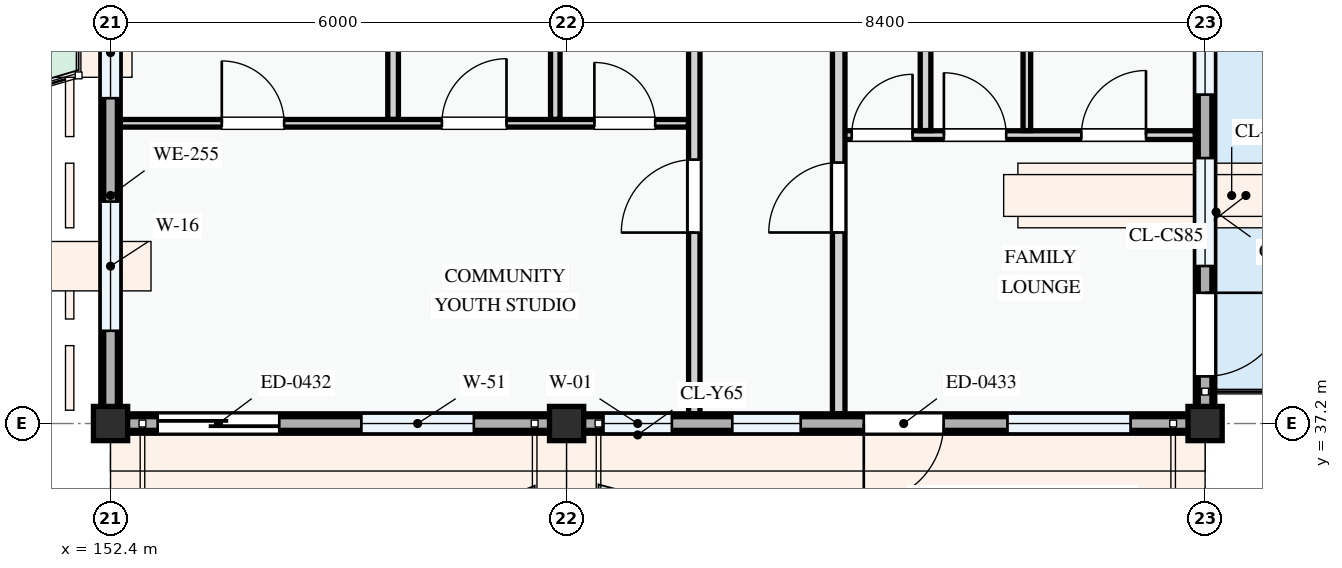
"""IFC4 building model, lengths in metres.
Left out: names, types, materials, properties, quantities, classifications, styles, units other than length and angle.
Written with IfcOpenShell. Run it as: python <this file> out.ifc"""

import sys

from ifc_helpers import new_model, si_unit, direction, frame, frame_2d, origin, origin_2d, place, context, subcontext, project, spatial, polyline, rectangle, outline, extrude, element, fill, save


model = new_model("IFC4")
c1 = context("Model", 3, precision=1e-05, world=origin(), true_north=direction((0.0, 1.0)))
c2 = subcontext(c1, "Body", "Model", "MODEL_VIEW")
j1 = project(units=[si_unit("LENGTHUNIT", "METRE"), si_unit("PLANEANGLEUNIT", "RADIAN")], contexts=[c1])
p1 = place(None, origin())
s1 = spatial("IfcSite", under=j1, at=p1, CompositionType="ELEMENT")
p2 = place(p1, origin())
s2 = spatial("IfcBuilding", under=s1, at=p2, CompositionType="ELEMENT")
p3 = place(p2, frame((0.0, 0.0, 27.9)))
s3 = spatial("IfcBuildingStorey", under=s2, at=p3, CompositionType="ELEMENT", Elevation=27.9)
for number, where, z_axis, x_axis in (
    (1, (152.4, 37.2, 0.0), (0.0, 0.0, 1.0), (1.0, 0.0, 0.0)),
    (2, (158.4, 37.2, 0.0), (0.0, 0.0, 1.0), (1.0, 0.0, 0.0)),
    (3, (166.8, 37.2, 0.0), (0.0, 0.0, 1.0), (1.0, 0.0, 0.0)),
):
    element("IfcColumn", number, at=place(p3, frame(where, z_axis=z_axis, x_axis=x_axis)), inside=s3, PredefinedType="COLUMN", context=c2, shape_type="SweptSolid", body=[
        extrude(rectangle(XDim=0.45, YDim=0.45, at=origin_2d()), origin(), (0.0, 0.0, 1.0), 3.3),
    ])
p4 = place(p3, frame((152.4, 43.2, 0.0), z_axis=(0.0, 0.0, 1.0), x_axis=(0.0, -1.0, 0.0)))
e4 = element("IfcWall", 4, at=p4, inside=s3, PredefinedType="STANDARD", context=c2, shape_type="SweptSolid", body=[
    extrude(rectangle(XDim=6.0, YDim=0.255, at=frame_2d((3.0, 0.0))), origin(), (0.0, 0.0, 1.0), 2.575),
])
p5 = place(p4, frame((0.52, 0.0, 0.78)))
e5 = element("IfcOpeningElement", 5, at=p5, cuts=e4, PredefinedType="OPENING", context=c2, shape_type="SweptSolid", body=[
    extrude(rectangle(XDim=1.2, YDim=1.5, at=frame_2d((0.6, 0.75))), frame((0.0, 0.137, 0.0), z_axis=(0.0, -1.0, 0.0), x_axis=(1.0, 0.0, 0.0)), (0.0, 0.0, 1.0), 0.275),
])
p6 = place(p4, frame((3.08, 0.0, 0.78)))
e6 = element("IfcOpeningElement", 6, at=p6, cuts=e4, PredefinedType="OPENING", context=c2, shape_type="SweptSolid", body=[
    extrude(rectangle(XDim=1.7, YDim=1.6, at=frame_2d((0.85, 0.8))), frame((0.0, 0.137, 0.0), z_axis=(0.0, -1.0, 0.0), x_axis=(1.0, 0.0, 0.0)), (0.0, 0.0, 1.0), 0.275),
])
p7 = place(p3, frame((152.4, 37.2, 0.0), z_axis=(0.0, 0.0, 1.0), x_axis=(1.0, 0.0, 0.0)))
e7 = element("IfcWall", 7, at=p7, inside=s3, PredefinedType="STANDARD", context=c2, shape_type="SweptSolid", body=[
    extrude(rectangle(XDim=6.0, YDim=0.255, at=frame_2d((3.0, 0.0))), origin(), (0.0, 0.0, 1.0), 2.475),
])
p8 = place(p7, frame((0.62, 0.0, 0.0)))
e8 = element("IfcOpeningElement", 8, at=p8, cuts=e7, PredefinedType="OPENING", context=c2, shape_type="SweptSolid", body=[
    extrude(rectangle(XDim=1.6, YDim=2.2, at=frame_2d((0.8, 1.1))), frame((0.0, 0.137, 0.0), z_axis=(0.0, -1.0, 0.0), x_axis=(1.0, 0.0, 0.0)), (0.0, 0.0, 1.0), 0.275),
])
p9 = place(p7, frame((3.3, 0.0, 0.78)))
e9 = element("IfcOpeningElement", 9, at=p9, cuts=e7, PredefinedType="OPENING", context=c2, shape_type="SweptSolid", body=[
    extrude(rectangle(XDim=1.48, YDim=1.52, at=frame_2d((0.74, 0.76))), frame((0.0, 0.137, 0.0), z_axis=(0.0, -1.0, 0.0), x_axis=(1.0, 0.0, 0.0)), (0.0, 0.0, 1.0), 0.275),
])
p10 = place(p3, frame((158.4, 37.2, 0.0), z_axis=(0.0, 0.0, 1.0), x_axis=(1.0, 0.0, 0.0)))
e10 = element("IfcWall", 10, at=p10, inside=s3, PredefinedType="STANDARD", context=c2, shape_type="SweptSolid", body=[
    extrude(rectangle(XDim=8.4, YDim=0.255, at=frame_2d((4.2, 0.0))), origin(), (0.0, 0.0, 1.0), 2.375),
])
p11 = place(p10, frame((3.91, 0.0, 0.0)))
e11 = element("IfcOpeningElement", 11, at=p11, cuts=e10, PredefinedType="OPENING", context=c2, shape_type="SweptSolid", body=[
    extrude(rectangle(XDim=1.05, YDim=2.15, at=frame_2d((0.525, 1.075))), frame((0.0, 0.137, 0.0), z_axis=(0.0, -1.0, 0.0), x_axis=(1.0, 0.0, 0.0)), (0.0, 0.0, 1.0), 0.275),
])
p12 = place(p10, frame((0.485, 0.0, 0.78)))
e12 = element("IfcOpeningElement", 12, at=p12, cuts=e10, PredefinedType="OPENING", context=c2, shape_type="SweptSolid", body=[
    extrude(rectangle(XDim=0.9, YDim=1.2, at=frame_2d((0.45, 0.6))), frame((0.0, 0.137, 0.0), z_axis=(0.0, -1.0, 0.0), x_axis=(1.0, 0.0, 0.0)), (0.0, 0.0, 1.0), 0.275),
])
p13 = place(p10, frame((2.18, 0.0, 0.78)))
e13 = element("IfcOpeningElement", 13, at=p13, cuts=e10, PredefinedType="OPENING", context=c2, shape_type="SweptSolid", body=[
    extrude(rectangle(XDim=0.9, YDim=1.2, at=frame_2d((0.45, 0.6))), frame((0.0, 0.137, 0.0), z_axis=(0.0, -1.0, 0.0), x_axis=(1.0, 0.0, 0.0)), (0.0, 0.0, 1.0), 0.275),
])
p14 = place(p10, frame((5.8, 0.0, 0.78)))
e14 = element("IfcOpeningElement", 14, at=p14, cuts=e10, PredefinedType="OPENING", context=c2, shape_type="SweptSolid", body=[
    extrude(rectangle(XDim=1.62, YDim=1.38, at=frame_2d((0.81, 0.69))), frame((0.0, 0.137, 0.0), z_axis=(0.0, -1.0, 0.0), x_axis=(1.0, 0.0, 0.0)), (0.0, 0.0, 1.0), 0.275),
])
p15 = place(p3, frame((166.8, 37.2, 0.0), z_axis=(0.0, 0.0, 1.0), x_axis=(0.0, 1.0, 0.0)))
e15 = element("IfcWall", 15, at=p15, inside=s3, PredefinedType="STANDARD", context=c2, shape_type="SweptSolid", body=[
    extrude(rectangle(XDim=6.0, YDim=0.255, at=frame_2d((3.0, 0.0))), origin(), (0.0, 0.0, 1.0), 2.445),
])
p16 = place(p15, frame((0.62, 0.0, 0.0)))
e16 = element("IfcOpeningElement", 16, at=p16, cuts=e15, PredefinedType="OPENING", context=c2, shape_type="SweptSolid", body=[
    extrude(rectangle(XDim=1.1, YDim=2.15, at=frame_2d((0.55, 1.075))), frame((0.0, 0.137, 0.0), z_axis=(0.0, -1.0, 0.0), x_axis=(1.0, 0.0, 0.0)), (0.0, 0.0, 1.0), 0.275),
])
p17 = place(p15, frame((2.072, 0.0, 0.78)))
e17 = element("IfcOpeningElement", 17, at=p17, cuts=e15, PredefinedType="OPENING", context=c2, shape_type="SweptSolid", body=[
    extrude(rectangle(XDim=1.42, YDim=1.38, at=frame_2d((0.71, 0.69))), frame((0.0, 0.137, 0.0), z_axis=(0.0, -1.0, 0.0), x_axis=(1.0, 0.0, 0.0)), (0.0, 0.0, 1.0), 0.275),
])
p18 = place(p15, frame((4.327, 0.0, 0.78)))
e18 = element("IfcOpeningElement", 18, at=p18, cuts=e15, PredefinedType="OPENING", context=c2, shape_type="SweptSolid", body=[
    extrude(rectangle(XDim=0.95, YDim=1.15, at=frame_2d((0.475, 0.575))), frame((0.0, 0.137, 0.0), z_axis=(0.0, -1.0, 0.0), x_axis=(1.0, 0.0, 0.0)), (0.0, 0.0, 1.0), 0.275),
])
p19 = place(p3, frame((152.4, 43.2, 3.3), z_axis=(0.0, 0.0, 1.0), x_axis=(0.0, -1.0, 0.0)))
e19 = element("IfcWall", 19, at=p19, inside=s3, PredefinedType="PARAPET", context=c2, shape_type="SweptSolid", body=[
    extrude(rectangle(XDim=6.0, YDim=0.18, at=frame_2d((3.0, 0.0))), origin(), (0.0, 0.0, 1.0), 1.15),
])
p20 = place(p3, frame((152.4, 37.2, 3.3), z_axis=(0.0, 0.0, 1.0), x_axis=(1.0, 0.0, 0.0)))
e20 = element("IfcWall", 20, at=p20, inside=s3, PredefinedType="PARAPET", context=c2, shape_type="SweptSolid", body=[
    extrude(outline(polyline([(0.0, 0.0), (6.0, 0.0), (6.0, 1.12), (5.5, 1.322), (5.0, 1.484), (4.5, 1.618), (4.0, 1.718), (3.5, 1.779), (3.0, 1.8), (2.5, 1.779), (2.0, 1.718), (1.5, 1.618), (1.0, 1.484), (0.5, 1.322), (0.0, 1.12), (0.0, 0.0)])), frame((0.0, 0.09, 0.0), z_axis=(0.0, -1.0, 0.0), x_axis=(1.0, 0.0, 0.0)), (0.0, 0.0, 1.0), 0.18),
])
p21 = place(p3, frame((158.4, 37.2, 3.3), z_axis=(0.0, 0.0, 1.0), x_axis=(1.0, 0.0, 0.0)))
e21 = element("IfcWall", 21, at=p21, inside=s3, PredefinedType="PARAPET", context=c2, shape_type="SweptSolid", body=[
    extrude(outline(polyline([(0.0, 0.0), (8.4, 0.0), (8.4, 1.12), (7.7, 1.322), (7.0, 1.484), (6.3, 1.618), (5.6, 1.718), (4.9, 1.779), (4.2, 1.8), (3.5, 1.779), (2.8, 1.718), (2.1, 1.618), (1.4, 1.484), (0.7, 1.322), (0.0, 1.12), (0.0, 0.0)])), frame((0.0, 0.09, 0.0), z_axis=(0.0, -1.0, 0.0), x_axis=(1.0, 0.0, 0.0)), (0.0, 0.0, 1.0), 0.18),
])
p22 = place(p3, frame((166.8, 37.2, 3.3), z_axis=(0.0, 0.0, 1.0), x_axis=(0.0, 1.0, 0.0)))
e22 = element("IfcWall", 22, at=p22, inside=s3, PredefinedType="PARAPET", context=c2, shape_type="SweptSolid", body=[
    extrude(outline(polyline([(0.0, 0.0), (6.0, 0.0), (6.0, 1.12), (5.5, 1.322), (5.0, 1.484), (4.5, 1.618), (4.0, 1.718), (3.5, 1.779), (3.0, 1.8), (2.5, 1.779), (2.0, 1.718), (1.5, 1.618), (1.0, 1.484), (0.5, 1.322), (0.0, 1.12), (0.0, 0.0)])), frame((0.0, 0.09, 0.0), z_axis=(0.0, -1.0, 0.0), x_axis=(1.0, 0.0, 0.0)), (0.0, 0.0, 1.0), 0.18),
])
p23 = place(p3, frame((152.53, 41.15, 0.0), z_axis=(0.0, 0.0, 1.0), x_axis=(1.0, 0.0, 0.0)))
e23 = element("IfcWall", 23, at=p23, inside=s3, PredefinedType="PARTITIONING", context=c2, shape_type="SweptSolid", body=[
    extrude(rectangle(XDim=7.473, YDim=0.1, at=frame_2d((3.737, 0.0))), origin(), (0.0, 0.0, 1.0), 3.0),
])
p24 = place(p23, frame((1.334, 0.0, 0.0)))
e24 = element("IfcOpeningElement", 24, at=p24, cuts=e23, PredefinedType="OPENING", context=c2, shape_type="SweptSolid", body=[
    extrude(rectangle(XDim=0.82, YDim=2.08, at=frame_2d((0.41, 1.04))), frame((0.0, 0.06, 0.0), z_axis=(0.0, -1.0, 0.0), x_axis=(1.0, 0.0, 0.0)), (0.0, 0.0, 1.0), 0.12),
])
p25 = place(p23, frame((4.23, 0.0, 0.0)))
e25 = element("IfcOpeningElement", 25, at=p25, cuts=e23, PredefinedType="OPENING", context=c2, shape_type="SweptSolid", body=[
    extrude(rectangle(XDim=0.85, YDim=2.1, at=frame_2d((0.425, 1.05))), frame((0.0, 0.06, 0.0), z_axis=(0.0, -1.0, 0.0), x_axis=(1.0, 0.0, 0.0)), (0.0, 0.0, 1.0), 0.12),
])
p26 = place(p23, frame((6.236, 0.0, 0.0)))
e26 = element("IfcOpeningElement", 26, at=p26, cuts=e23, PredefinedType="OPENING", context=c2, shape_type="SweptSolid", body=[
    extrude(rectangle(XDim=0.8, YDim=2.1, at=frame_2d((0.4, 1.05))), frame((0.0, 0.06, 0.0), z_axis=(0.0, -1.0, 0.0), x_axis=(1.0, 0.0, 0.0)), (0.0, 0.0, 1.0), 0.12),
])
p27 = place(p3, frame((156.118, 41.202, 0.0), z_axis=(0.0, 0.0, 1.0), x_axis=(0.0, 1.0, 0.0)))
e27 = element("IfcWall", 27, at=p27, inside=s3, PredefinedType="PARTITIONING", context=c2, shape_type="SweptSolid", body=[
    extrude(rectangle(XDim=3.744, YDim=0.14, at=frame_2d((1.872, 0.0))), origin(), (0.0, 0.0, 1.0), 3.0),
])
p28 = place(p3, frame((158.251, 41.202, 0.0), z_axis=(0.0, 0.0, 1.0), x_axis=(0.0, 1.0, 0.0)))
e28 = element("IfcWall", 28, at=p28, inside=s3, PredefinedType="PARTITIONING", context=c2, shape_type="SweptSolid", body=[
    extrude(rectangle(XDim=3.744, YDim=0.125, at=frame_2d((1.872, 0.0))), origin(), (0.0, 0.0, 1.0), 2.425),
])
p29 = place(p3, frame((161.98, 40.994, 0.0), z_axis=(0.0, 0.0, 1.0), x_axis=(1.0, 0.0, 0.0)))
e29 = element("IfcWall", 29, at=p29, inside=s3, PredefinedType="PARTITIONING", context=c2, shape_type="SweptSolid", body=[
    extrude(rectangle(XDim=4.69, YDim=0.115, at=frame_2d((2.345, 0.0))), origin(), (0.0, 0.0, 1.0), 3.0),
])
p30 = place(p29, frame((0.171, 0.0, 0.0)))
e30 = element("IfcOpeningElement", 30, at=p30, cuts=e29, PredefinedType="OPENING", context=c2, shape_type="SweptSolid", body=[
    extrude(rectangle(XDim=0.8, YDim=2.1, at=frame_2d((0.4, 1.05))), frame((0.0, 0.067, 0.0), z_axis=(0.0, -1.0, 0.0), x_axis=(1.0, 0.0, 0.0)), (0.0, 0.0, 1.0), 0.135),
])
p31 = place(p29, frame((1.384, 0.0, 0.0)))
e31 = element("IfcOpeningElement", 31, at=p31, cuts=e29, PredefinedType="OPENING", context=c2, shape_type="SweptSolid", body=[
    extrude(rectangle(XDim=0.82, YDim=2.08, at=frame_2d((0.41, 1.04))), frame((0.0, 0.067, 0.0), z_axis=(0.0, -1.0, 0.0), x_axis=(1.0, 0.0, 0.0)), (0.0, 0.0, 1.0), 0.135),
])
p32 = place(p29, frame((3.193, 0.0, 0.0)))
e32 = element("IfcOpeningElement", 32, at=p32, cuts=e29, PredefinedType="OPENING", context=c2, shape_type="SweptSolid", body=[
    extrude(rectangle(XDim=0.85, YDim=2.1, at=frame_2d((0.425, 1.05))), frame((0.0, 0.067, 0.0), z_axis=(0.0, -1.0, 0.0), x_axis=(1.0, 0.0, 0.0)), (0.0, 0.0, 1.0), 0.135),
])
p33 = place(p3, frame((164.455, 41.054, 0.0), z_axis=(0.0, 0.0, 1.0), x_axis=(0.0, 1.0, 0.0)))
e33 = element("IfcWall", 33, at=p33, inside=s3, PredefinedType="PARTITIONING", context=c2, shape_type="SweptSolid", body=[
    extrude(rectangle(XDim=3.884, YDim=0.1, at=frame_2d((1.942, 0.0))), origin(), (0.0, 0.0, 1.0), 3.0),
])
p34 = place(p3, frame((163.122, 41.054, 0.0), z_axis=(0.0, 0.0, 1.0), x_axis=(0.0, 1.0, 0.0)))
e34 = element("IfcWall", 34, at=p34, inside=s3, PredefinedType="PARTITIONING", context=c2, shape_type="SweptSolid", body=[
    extrude(rectangle(XDim=3.884, YDim=0.14, at=frame_2d((1.942, 0.0))), origin(), (0.0, 0.0, 1.0), 3.0),
])
p35 = place(p3, frame((160.08, 37.33, 0.0), z_axis=(0.0, 0.0, 1.0), x_axis=(0.0, 1.0, 0.0)))
e35 = element("IfcWall", 35, at=p35, inside=s3, PredefinedType="PARTITIONING", context=c2, shape_type="SweptSolid", body=[
    extrude(rectangle(XDim=20.41, YDim=0.15, at=frame_2d((10.205, 0.0))), origin(), (0.0, 0.0, 1.0), 3.0),
])
p36 = place(p35, frame((2.383, 0.0, 0.0)))
e36 = element("IfcOpeningElement", 36, at=p36, cuts=e35, PredefinedType="OPENING", context=c2, shape_type="SweptSolid", body=[
    extrude(rectangle(XDim=0.96, YDim=2.12, at=frame_2d((0.48, 1.06))), frame((0.0, 0.085, 0.0), z_axis=(0.0, -1.0, 0.0), x_axis=(1.0, 0.0, 0.0)), (0.0, 0.0, 1.0), 0.17),
])
p37 = place(p35, frame((9.605, 0.0, 0.0)))
e37 = element("IfcOpeningElement", 37, at=p37, cuts=e35, PredefinedType="OPENING", context=c2, shape_type="SweptSolid", body=[
    extrude(rectangle(XDim=0.92, YDim=2.1, at=frame_2d((0.46, 1.05))), frame((0.0, 0.085, 0.0), z_axis=(0.0, -1.0, 0.0), x_axis=(1.0, 0.0, 0.0)), (0.0, 0.0, 1.0), 0.17),
])
p38 = place(p3, frame((161.98, 37.33, 0.0), z_axis=(0.0, 0.0, 1.0), x_axis=(0.0, 1.0, 0.0)))
e38 = element("IfcWall", 38, at=p38, inside=s3, PredefinedType="PARTITIONING", context=c2, shape_type="SweptSolid", body=[
    extrude(rectangle(XDim=20.41, YDim=0.165, at=frame_2d((10.205, 0.0))), origin(), (0.0, 0.0, 1.0), 3.0),
])
p39 = place(p38, frame((2.384, 0.0, 0.0)))
e39 = element("IfcOpeningElement", 39, at=p39, cuts=e38, PredefinedType="OPENING", context=c2, shape_type="SweptSolid", body=[
    extrude(rectangle(XDim=0.92, YDim=2.1, at=frame_2d((0.46, 1.05))), frame((0.0, 0.093, 0.0), z_axis=(0.0, -1.0, 0.0), x_axis=(1.0, 0.0, 0.0)), (0.0, 0.0, 1.0), 0.185),
])
p40 = place(p38, frame((9.628, 0.0, 0.0)))
e40 = element("IfcOpeningElement", 40, at=p40, cuts=e38, PredefinedType="OPENING", context=c2, shape_type="SweptSolid", body=[
    extrude(rectangle(XDim=0.92, YDim=2.1, at=frame_2d((0.46, 1.05))), frame((0.0, 0.093, 0.0), z_axis=(0.0, -1.0, 0.0), x_axis=(1.0, 0.0, 0.0)), (0.0, 0.0, 1.0), 0.185),
])
p41 = place(p5, origin())
e41 = element("IfcWindow", 41, at=p41, inside=s3, PartitioningType="SINGLE_PANEL", PredefinedType="WINDOW", context=c2, shape_type="SweptSolid", body=[
    extrude(rectangle(XDim=1.2, YDim=1.5, at=frame_2d((0.6, 0.75))), frame((0.0, 0.03, 0.0), z_axis=(0.0, -1.0, 0.0), x_axis=(1.0, 0.0, 0.0)), (0.0, 0.0, 1.0), 0.06),
])
fill(e5, e41)
p42 = place(p6, origin())
e42 = element("IfcWindow", 42, at=p42, inside=s3, PartitioningType="DOUBLE_PANEL_VERTICAL", PredefinedType="WINDOW", context=c2, shape_type="SweptSolid", body=[
    extrude(rectangle(XDim=1.7, YDim=1.6, at=frame_2d((0.85, 0.8))), frame((0.0, 0.03, 0.0), z_axis=(0.0, -1.0, 0.0), x_axis=(1.0, 0.0, 0.0)), (0.0, 0.0, 1.0), 0.06),
])
fill(e6, e42)
p43 = place(p8, frame((1.6, 0.0, 0.0), z_axis=(0.0, 0.0, 1.0), x_axis=(-1.0, 0.0, 0.0)))
e43 = element("IfcDoor", 43, at=p43, inside=s3, OperationType="SLIDING_TO_LEFT", PredefinedType="DOOR", context=c2, shape_type="SweptSolid", body=[
    extrude(rectangle(XDim=1.6, YDim=2.2, at=frame_2d((0.8, 1.1))), frame((0.0, 0.025, 0.0), z_axis=(0.0, -1.0, 0.0), x_axis=(1.0, 0.0, 0.0)), (0.0, 0.0, 1.0), 0.05),
])
fill(e8, e43)
p44 = place(p9, origin())
e44 = element("IfcWindow", 44, at=p44, inside=s3, PartitioningType="SINGLE_PANEL", PredefinedType="WINDOW", context=c2, shape_type="SweptSolid", body=[
    extrude(rectangle(XDim=1.48, YDim=1.52, at=frame_2d((0.74, 0.76))), frame((0.0, 0.03, 0.0), z_axis=(0.0, -1.0, 0.0), x_axis=(1.0, 0.0, 0.0)), (0.0, 0.0, 1.0), 0.06),
])
fill(e9, e44)
p45 = place(p11, frame((1.05, 0.0, 0.0), z_axis=(0.0, 0.0, 1.0), x_axis=(-1.0, 0.0, 0.0)))
e45 = element("IfcDoor", 45, at=p45, inside=s3, OperationType="SINGLE_SWING_RIGHT", PredefinedType="DOOR", context=c2, shape_type="SweptSolid", body=[
    extrude(rectangle(XDim=1.05, YDim=2.15, at=frame_2d((0.525, 1.075))), frame((0.0, 0.025, 0.0), z_axis=(0.0, -1.0, 0.0), x_axis=(1.0, 0.0, 0.0)), (0.0, 0.0, 1.0), 0.05),
])
fill(e11, e45)
p46 = place(p12, origin())
e46 = element("IfcWindow", 46, at=p46, inside=s3, PartitioningType="SINGLE_PANEL", PredefinedType="WINDOW", context=c2, shape_type="SweptSolid", body=[
    extrude(rectangle(XDim=0.9, YDim=1.2, at=frame_2d((0.45, 0.6))), frame((0.0, 0.03, 0.0), z_axis=(0.0, -1.0, 0.0), x_axis=(1.0, 0.0, 0.0)), (0.0, 0.0, 1.0), 0.06),
])
fill(e12, e46)
p47 = place(p13, origin())
e47 = element("IfcWindow", 47, at=p47, inside=s3, PartitioningType="SINGLE_PANEL", PredefinedType="WINDOW", context=c2, shape_type="SweptSolid", body=[
    extrude(rectangle(XDim=0.9, YDim=1.2, at=frame_2d((0.45, 0.6))), frame((0.0, 0.03, 0.0), z_axis=(0.0, -1.0, 0.0), x_axis=(1.0, 0.0, 0.0)), (0.0, 0.0, 1.0), 0.06),
])
fill(e13, e47)
p48 = place(p14, origin())
e48 = element("IfcWindow", 48, at=p48, inside=s3, PartitioningType="DOUBLE_PANEL_VERTICAL", PredefinedType="WINDOW", context=c2, shape_type="SweptSolid", body=[
    extrude(rectangle(XDim=1.62, YDim=1.38, at=frame_2d((0.81, 0.69))), frame((0.0, 0.03, 0.0), z_axis=(0.0, -1.0, 0.0), x_axis=(1.0, 0.0, 0.0)), (0.0, 0.0, 1.0), 0.06),
])
fill(e14, e48)
p49 = place(p16, frame((1.1, 0.0, 0.0), z_axis=(0.0, 0.0, 1.0), x_axis=(-1.0, 0.0, 0.0)))
e49 = element("IfcDoor", 49, at=p49, inside=s3, OperationType="SINGLE_SWING_LEFT", PredefinedType="DOOR", context=c2, shape_type="SweptSolid", body=[
    extrude(rectangle(XDim=1.1, YDim=2.15, at=frame_2d((0.55, 1.075))), frame((0.0, 0.025, 0.0), z_axis=(0.0, -1.0, 0.0), x_axis=(1.0, 0.0, 0.0)), (0.0, 0.0, 1.0), 0.05),
])
fill(e16, e49)
p50 = place(p17, origin())
e50 = element("IfcWindow", 50, at=p50, inside=s3, PartitioningType="SINGLE_PANEL", PredefinedType="WINDOW", context=c2, shape_type="SweptSolid", body=[
    extrude(rectangle(XDim=1.42, YDim=1.38, at=frame_2d((0.71, 0.69))), frame((0.0, 0.03, 0.0), z_axis=(0.0, -1.0, 0.0), x_axis=(1.0, 0.0, 0.0)), (0.0, 0.0, 1.0), 0.06),
])
fill(e17, e50)
p51 = place(p18, origin())
e51 = element("IfcWindow", 51, at=p51, inside=s3, PartitioningType="SINGLE_PANEL", PredefinedType="WINDOW", context=c2, shape_type="SweptSolid", body=[
    extrude(rectangle(XDim=0.95, YDim=1.15, at=frame_2d((0.475, 0.575))), frame((0.0, 0.03, 0.0), z_axis=(0.0, -1.0, 0.0), x_axis=(1.0, 0.0, 0.0)), (0.0, 0.0, 1.0), 0.06),
])
fill(e18, e51)
p52 = place(p24, origin())
e52 = element("IfcDoor", 52, at=p52, inside=s3, OperationType="SINGLE_SWING_LEFT", PredefinedType="DOOR", context=c2, shape_type="SweptSolid", body=[
    extrude(rectangle(XDim=0.82, YDim=2.08, at=frame_2d((0.41, 1.04))), frame((0.0, 0.025, 0.0), z_axis=(0.0, -1.0, 0.0), x_axis=(1.0, 0.0, 0.0)), (0.0, 0.0, 1.0), 0.05),
])
fill(e24, e52)
p53 = place(p25, origin())
e53 = element("IfcDoor", 53, at=p53, inside=s3, OperationType="SINGLE_SWING_RIGHT", PredefinedType="DOOR", context=c2, shape_type="SweptSolid", body=[
    extrude(rectangle(XDim=0.85, YDim=2.1, at=frame_2d((0.425, 1.05))), frame((0.0, 0.025, 0.0), z_axis=(0.0, -1.0, 0.0), x_axis=(1.0, 0.0, 0.0)), (0.0, 0.0, 1.0), 0.05),
])
fill(e25, e53)
p54 = place(p26, origin())
e54 = element("IfcDoor", 54, at=p54, inside=s3, OperationType="SINGLE_SWING_LEFT", PredefinedType="DOOR", context=c2, shape_type="SweptSolid", body=[
    extrude(rectangle(XDim=0.8, YDim=2.1, at=frame_2d((0.4, 1.05))), frame((0.0, 0.025, 0.0), z_axis=(0.0, -1.0, 0.0), x_axis=(1.0, 0.0, 0.0)), (0.0, 0.0, 1.0), 0.05),
])
fill(e26, e54)
p55 = place(p30, origin())
e55 = element("IfcDoor", 55, at=p55, inside=s3, OperationType="SINGLE_SWING_RIGHT", PredefinedType="DOOR", context=c2, shape_type="SweptSolid", body=[
    extrude(rectangle(XDim=0.8, YDim=2.1, at=frame_2d((0.4, 1.05))), frame((0.0, 0.025, 0.0), z_axis=(0.0, -1.0, 0.0), x_axis=(1.0, 0.0, 0.0)), (0.0, 0.0, 1.0), 0.05),
])
fill(e30, e55)
p56 = place(p31, origin())
e56 = element("IfcDoor", 56, at=p56, inside=s3, OperationType="SINGLE_SWING_LEFT", PredefinedType="DOOR", context=c2, shape_type="SweptSolid", body=[
    extrude(rectangle(XDim=0.82, YDim=2.08, at=frame_2d((0.41, 1.04))), frame((0.0, 0.025, 0.0), z_axis=(0.0, -1.0, 0.0), x_axis=(1.0, 0.0, 0.0)), (0.0, 0.0, 1.0), 0.05),
])
fill(e31, e56)
p57 = place(p32, origin())
e57 = element("IfcDoor", 57, at=p57, inside=s3, OperationType="SINGLE_SWING_RIGHT", PredefinedType="DOOR", context=c2, shape_type="SweptSolid", body=[
    extrude(rectangle(XDim=0.85, YDim=2.1, at=frame_2d((0.425, 1.05))), frame((0.0, 0.025, 0.0), z_axis=(0.0, -1.0, 0.0), x_axis=(1.0, 0.0, 0.0)), (0.0, 0.0, 1.0), 0.05),
])
fill(e32, e57)
p58 = place(p36, origin())
e58 = element("IfcDoor", 58, at=p58, inside=s3, OperationType="SINGLE_SWING_LEFT", PredefinedType="DOOR", context=c2, shape_type="SweptSolid", body=[
    extrude(rectangle(XDim=0.96, YDim=2.12, at=frame_2d((0.48, 1.06))), frame((0.0, 0.025, 0.0), z_axis=(0.0, -1.0, 0.0), x_axis=(1.0, 0.0, 0.0)), (0.0, 0.0, 1.0), 0.05),
])
fill(e36, e58)
p59 = place(p39, origin())
e59 = element("IfcDoor", 59, at=p59, inside=s3, OperationType="SINGLE_SWING_LEFT", PredefinedType="DOOR", context=c2, shape_type="SweptSolid", body=[
    extrude(rectangle(XDim=0.92, YDim=2.1, at=frame_2d((0.46, 1.05))), frame((0.0, 0.025, 0.0), z_axis=(0.0, -1.0, 0.0), x_axis=(1.0, 0.0, 0.0)), (0.0, 0.0, 1.0), 0.05),
])
fill(e39, e59)
save(model, sys.argv[1])
